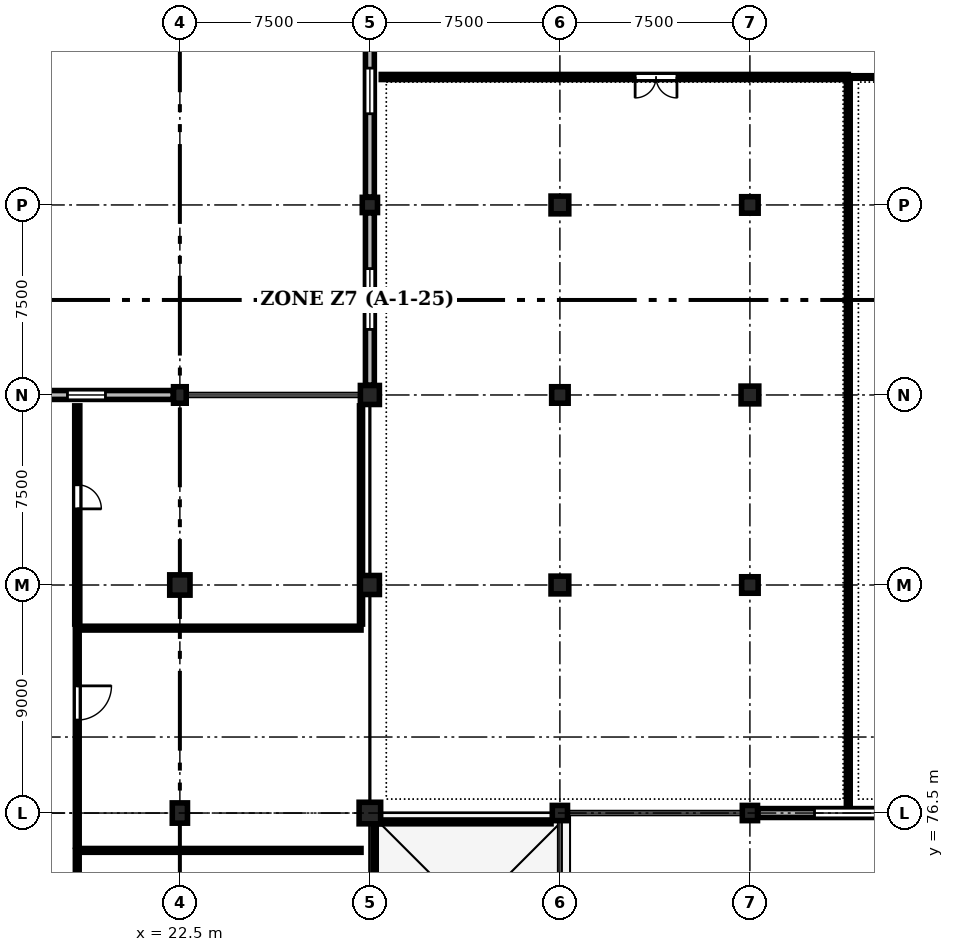
"""IFC4 building model, lengths in metres.
Left out: names, types, materials, properties, quantities, classifications, styles, units other than length and angle.
Written with IfcOpenShell. Run it as: python <this file> out.ifc"""

import sys

from ifc_helpers import new_model, si_unit, direction, frame, frame_2d, origin, origin_2d, place, context, subcontext, project, spatial, rectangle, circle, extrude, element, fill, save


model = new_model("IFC4")
c1 = context("Model", 3, precision=1e-05, world=origin(), true_north=direction((0.0, 1.0)))
c2 = subcontext(c1, "Body", "Model", "MODEL_VIEW")
j1 = project(units=[si_unit("LENGTHUNIT", "METRE"), si_unit("PLANEANGLEUNIT", "RADIAN")], contexts=[c1])
p1 = place(None, origin())
s1 = spatial("IfcSite", under=j1, at=p1, CompositionType="ELEMENT")
p2 = place(p1, origin())
s2 = spatial("IfcBuilding", under=s1, at=p2, CompositionType="ELEMENT")
p3 = place(p2, frame((0.0, 0.0, 4.8)))
s3 = spatial("IfcBuildingStorey", under=s2, at=p3, CompositionType="ELEMENT", Elevation=4.8)
p4 = place(p3, frame((22.5, 76.5, 0.0), z_axis=(0.0, 0.0, 1.0), x_axis=(1.0, 0.0, 0.0)))
e1 = element("IfcColumn", 1, at=p4, inside=s3, PredefinedType="COLUMN", context=c2, shape_type="SweptSolid", body=[
    extrude(rectangle(XDim=0.6, YDim=0.8, at=origin_2d()), origin(), (0.0, 0.0, 1.0), 4.5),
])
p5 = place(p3, frame((22.5, 85.5, 0.0), z_axis=(0.0, 0.0, 1.0), x_axis=(1.0, 0.0, 0.0)))
e2 = element("IfcColumn", 2, at=p5, inside=s3, PredefinedType="COLUMN", context=c2, shape_type="SweptSolid", body=[
    extrude(rectangle(XDim=0.8, YDim=0.8, at=origin_2d()), origin(), (0.0, 0.0, 1.0), 4.5),
])
p6 = place(p3, frame((22.5, 93.0, 0.0), z_axis=(0.0, 0.0, 1.0), x_axis=(1.0, 0.0, 0.0)))
e3 = element("IfcColumn", 3, at=p6, inside=s3, PredefinedType="COLUMN", context=c2, shape_type="SweptSolid", body=[
    extrude(rectangle(XDim=0.5, YDim=0.65, at=origin_2d()), origin(), (0.0, 0.0, 1.0), 4.5),
])
p7 = place(p3, frame((30.0, 76.5, 0.0), z_axis=(0.0, 0.0, 1.0), x_axis=(1.0, 0.0, 0.0)))
e4 = element("IfcColumn", 4, at=p7, inside=s3, PredefinedType="COLUMN", context=c2, shape_type="SweptSolid", body=[
    extrude(rectangle(XDim=0.85, YDim=0.85, at=origin_2d()), origin(), (0.0, 0.0, 1.0), 4.5),
])
p8 = place(p3, frame((30.0, 85.5, 0.0), z_axis=(0.0, 0.0, 1.0), x_axis=(1.0, 0.0, 0.0)))
e5 = element("IfcColumn", 5, at=p8, inside=s3, PredefinedType="COLUMN", context=c2, shape_type="SweptSolid", body=[
    extrude(circle(Radius=0.375, at=origin_2d()), origin(), (0.0, 0.0, 1.0), 4.5),
])
p9 = place(p3, frame((30.0, 93.0, 0.0), z_axis=(0.0, 0.0, 1.0), x_axis=(1.0, 0.0, 0.0)))
e6 = element("IfcColumn", 6, at=p9, inside=s3, PredefinedType="COLUMN", context=c2, shape_type="SweptSolid", body=[
    extrude(rectangle(XDim=0.75, YDim=0.75, at=origin_2d()), origin(), (0.0, 0.0, 1.0), 4.5),
])
p10 = place(p3, frame((30.0, 100.5, 0.0), z_axis=(0.0, 0.0, 1.0), x_axis=(1.0, 0.0, 0.0)))
e7 = element("IfcColumn", 7, at=p10, inside=s3, PredefinedType="COLUMN", context=c2, shape_type="SweptSolid", body=[
    extrude(rectangle(XDim=0.6, YDim=0.6, at=origin_2d()), origin(), (0.0, 0.0, 1.0), 4.5),
])
p11 = place(p3, frame((37.5, 76.5, 0.0), z_axis=(0.0, 0.0, 1.0), x_axis=(1.0, 0.0, 0.0)))
e8 = element("IfcColumn", 8, at=p11, inside=s3, PredefinedType="COLUMN", context=c2, shape_type="SweptSolid", body=[
    extrude(circle(Radius=0.3, at=origin_2d()), origin(), (0.0, 0.0, 1.0), 4.5),
])
p12 = place(p3, frame((37.5, 85.5, 0.0), z_axis=(0.0, 0.0, 1.0), x_axis=(1.0, 0.0, 0.0)))
e9 = element("IfcColumn", 9, at=p12, inside=s3, PredefinedType="COLUMN", context=c2, shape_type="SweptSolid", body=[
    extrude(rectangle(XDim=0.7, YDim=0.7, at=origin_2d()), origin(), (0.0, 0.0, 1.0), 4.5),
])
p13 = place(p3, frame((37.5, 93.0, 0.0), z_axis=(0.0, 0.0, 1.0), x_axis=(1.0, 0.0, 0.0)))
e10 = element("IfcColumn", 10, at=p13, inside=s3, PredefinedType="COLUMN", context=c2, shape_type="SweptSolid", body=[
    extrude(rectangle(XDim=0.65, YDim=0.65, at=origin_2d()), origin(), (0.0, 0.0, 1.0), 4.5),
])
p14 = place(p3, frame((37.5, 100.5, 0.0), z_axis=(0.0, 0.0, 1.0), x_axis=(1.0, 0.0, 0.0)))
e11 = element("IfcColumn", 11, at=p14, inside=s3, PredefinedType="COLUMN", context=c2, shape_type="SweptSolid", body=[
    extrude(rectangle(XDim=0.7, YDim=0.7, at=origin_2d()), origin(), (0.0, 0.0, 1.0), 4.5),
])
p15 = place(p3, frame((45.0, 76.5, 0.0), z_axis=(0.0, 0.0, 1.0), x_axis=(1.0, 0.0, 0.0)))
e12 = element("IfcColumn", 12, at=p15, inside=s3, PredefinedType="COLUMN", context=c2, shape_type="SweptSolid", body=[
    extrude(rectangle(XDim=0.6, YDim=0.6, at=origin_2d()), origin(), (0.0, 0.0, 1.0), 4.5),
])
p16 = place(p3, frame((45.0, 85.5, 0.0), z_axis=(0.0, 0.0, 1.0), x_axis=(1.0, 0.0, 0.0)))
e13 = element("IfcColumn", 13, at=p16, inside=s3, PredefinedType="COLUMN", context=c2, shape_type="SweptSolid", body=[
    extrude(rectangle(XDim=0.65, YDim=0.65, at=origin_2d()), origin(), (0.0, 0.0, 1.0), 4.5),
])
p17 = place(p3, frame((45.0, 93.0, 0.0), z_axis=(0.0, 0.0, 1.0), x_axis=(1.0, 0.0, 0.0)))
e14 = element("IfcColumn", 14, at=p17, inside=s3, PredefinedType="COLUMN", context=c2, shape_type="SweptSolid", body=[
    extrude(rectangle(XDim=0.7, YDim=0.7, at=origin_2d()), origin(), (0.0, 0.0, 1.0), 4.5),
])
p18 = place(p3, frame((45.0, 100.5, 0.0), z_axis=(0.0, 0.0, 1.0), x_axis=(1.0, 0.0, 0.0)))
e15 = element("IfcColumn", 15, at=p18, inside=s3, PredefinedType="COLUMN", context=c2, shape_type="SweptSolid", body=[
    extrude(rectangle(XDim=0.65, YDim=0.65, at=origin_2d()), origin(), (0.0, 0.0, 1.0), 4.5),
])
p19 = place(p3, frame((15.385, 93.0, 0.0), z_axis=(0.0, 0.0, 1.0), x_axis=(1.0, 0.0, 0.0)))
e16 = element("IfcWall", 16, at=p19, inside=s3, PredefinedType="STANDARD", context=c2, shape_type="SweptSolid", body=[
    extrude(rectangle(XDim=6.855, YDim=0.35, at=frame_2d((3.427, 0.0))), origin(), (0.0, 0.0, 1.0), 3.63),
])
p20 = place(p19, frame((2.677, 0.0, 0.9)))
e17 = element("IfcOpeningElement", 17, at=p20, cuts=e16, PredefinedType="OPENING", context=c2, shape_type="SweptSolid", body=[
    extrude(rectangle(XDim=1.5, YDim=2.4, at=frame_2d((0.75, 1.2))), frame((0.0, 0.185, 0.0), z_axis=(0.0, -1.0, 0.0), x_axis=(1.0, 0.0, 0.0)), (0.0, 0.0, 1.0), 0.37),
])
p21 = place(p3, frame((30.0, 93.385, 0.0), z_axis=(0.0, 0.0, 1.0), x_axis=(0.0, 1.0, 0.0)))
e18 = element("IfcWall", 18, at=p21, inside=s3, PredefinedType="STANDARD", context=c2, shape_type="SweptSolid", body=[
    extrude(rectangle(XDim=6.805, YDim=0.35, at=frame_2d((3.402, 0.0))), origin(), (0.0, 0.0, 1.0), 3.63),
])
p22 = place(p21, frame((2.202, 0.0, 0.9)))
e19 = element("IfcOpeningElement", 19, at=p22, cuts=e18, PredefinedType="OPENING", context=c2, shape_type="SweptSolid", body=[
    extrude(rectangle(XDim=2.4, YDim=2.45, at=frame_2d((1.2, 1.225))), frame((0.0, 0.185, 0.0), z_axis=(0.0, -1.0, 0.0), x_axis=(1.0, 0.0, 0.0)), (0.0, 0.0, 1.0), 0.37),
])
p23 = place(p3, frame((30.0, 100.81, 0.0), z_axis=(0.0, 0.0, 1.0), x_axis=(0.0, 1.0, 0.0)))
e20 = element("IfcWall", 20, at=p23, inside=s3, PredefinedType="STANDARD", context=c2, shape_type="SweptSolid", body=[
    extrude(rectangle(XDim=8.38, YDim=0.35, at=frame_2d((4.19, 0.0))), origin(), (0.0, 0.0, 1.0), 3.63),
])
p24 = place(p23, frame((3.29, 0.0, 0.9)))
e21 = element("IfcOpeningElement", 21, at=p24, cuts=e20, PredefinedType="OPENING", context=c2, shape_type="SweptSolid", body=[
    extrude(rectangle(XDim=1.8, YDim=2.1, at=frame_2d((0.9, 1.05))), frame((0.0, 0.185, 0.0), z_axis=(0.0, -1.0, 0.0), x_axis=(1.0, 0.0, 0.0)), (0.0, 0.0, 1.0), 0.37),
])
p25 = place(p3, frame((52.19, 76.5, 0.0), z_axis=(0.0, 0.0, 1.0), x_axis=(-1.0, 0.0, 0.0)))
e22 = element("IfcWall", 22, at=p25, inside=s3, PredefinedType="STANDARD", context=c2, shape_type="SweptSolid", body=[
    extrude(rectangle(XDim=6.88, YDim=0.35, at=frame_2d((3.44, 0.0))), origin(), (0.0, 0.0, 1.0), 3.63),
])
p26 = place(p25, frame((2.24, 0.0, 0.9)))
e23 = element("IfcOpeningElement", 23, at=p26, cuts=e22, PredefinedType="OPENING", context=c2, shape_type="SweptSolid", body=[
    extrude(rectangle(XDim=2.4, YDim=2.45, at=frame_2d((1.2, 1.225))), frame((0.0, 0.185, 0.0), z_axis=(0.0, -1.0, 0.0), x_axis=(1.0, 0.0, 0.0)), (0.0, 0.0, 1.0), 0.37),
])
p27 = place(p3, frame((18.45, 75.026, 0.0), z_axis=(0.0, 0.0, 1.0), x_axis=(0.0, -1.0, 0.0)))
e24 = element("IfcWall", 24, at=p27, inside=s3, PredefinedType="PARTITIONING", context=c2, shape_type="SweptSolid", body=[
    extrude(rectangle(XDim=8.612, YDim=0.15, at=frame_2d((4.306, 0.0))), origin(), (0.0, 0.0, 1.0), 3.765),
])
p28 = place(p27, frame((1.603, 0.0, 0.0)))
e25 = element("IfcOpeningElement", 25, at=p28, cuts=e24, PredefinedType="OPENING", context=c2, shape_type="SweptSolid", body=[
    extrude(rectangle(XDim=1.35, YDim=2.25, at=frame_2d((0.675, 1.125))), frame((0.0, 0.085, 0.0), z_axis=(0.0, -1.0, 0.0), x_axis=(1.0, 0.0, 0.0)), (0.0, 0.0, 1.0), 0.17),
])
p29 = place(p3, frame((18.45, 83.798, 0.0), z_axis=(0.0, 0.0, 1.0), x_axis=(0.0, -1.0, 0.0)))
e26 = element("IfcWall", 26, at=p29, inside=s3, PredefinedType="PARTITIONING", context=c2, shape_type="SweptSolid", body=[
    extrude(rectangle(XDim=8.612, YDim=0.15, at=frame_2d((4.306, 0.0))), origin(), (0.0, 0.0, 1.0), 3.765),
])
p30 = place(p29, frame((2.279, 0.0, 0.0)))
e27 = element("IfcOpeningElement", 27, at=p30, cuts=e26, PredefinedType="OPENING", context=c2, shape_type="SweptSolid", body=[
    extrude(rectangle(XDim=1.35, YDim=2.25, at=frame_2d((0.675, 1.125))), frame((0.0, 0.085, 0.0), z_axis=(0.0, -1.0, 0.0), x_axis=(1.0, 0.0, 0.0)), (0.0, 0.0, 1.0), 0.17),
])
p31 = place(p3, frame((18.45, 92.57, 0.0), z_axis=(0.0, 0.0, 1.0), x_axis=(0.0, -1.0, 0.0)))
e28 = element("IfcWall", 28, at=p31, inside=s3, PredefinedType="STANDARD", context=c2, shape_type="SweptSolid", body=[
    extrude(rectangle(XDim=8.612, YDim=0.2, at=frame_2d((4.306, 0.0))), origin(), (0.0, 0.0, 1.0), 3.765),
])
p32 = place(p31, frame((3.115, 0.0, 0.0)))
e29 = element("IfcOpeningElement", 29, at=p32, cuts=e28, PredefinedType="OPENING", context=c2, shape_type="SweptSolid", body=[
    extrude(rectangle(XDim=0.95, YDim=2.15, at=frame_2d((0.475, 1.075))), frame((0.0, 0.11, 0.0), z_axis=(0.0, -1.0, 0.0), x_axis=(1.0, 0.0, 0.0)), (0.0, 0.0, 1.0), 0.22),
])
p33 = place(p3, frame((30.2, 76.15, 0.0), z_axis=(0.0, 0.0, 1.0), x_axis=(0.0, -1.0, 0.0)))
e30 = element("IfcWall", 30, at=p33, inside=s3, PredefinedType="PARTITIONING", context=c2, shape_type="SweptSolid", body=[
    extrude(rectangle(XDim=44.65, YDim=0.1, at=frame_2d((22.325, 0.0))), origin(), (0.0, 0.0, 1.0), 3.615),
])
p34 = place(p33, frame((17.49, 0.0, 0.0)))
e31 = element("IfcOpeningElement", 31, at=p34, cuts=e30, PredefinedType="OPENING", context=c2, shape_type="SweptSolid", body=[
    extrude(rectangle(XDim=1.05, YDim=2.2, at=frame_2d((0.525, 1.1))), frame((0.0, 0.06, 0.0), z_axis=(0.0, -1.0, 0.0), x_axis=(1.0, 0.0, 0.0)), (0.0, 0.0, 1.0), 0.12),
])
p35 = place(p3, frame((48.883, 105.55, 0.0), z_axis=(0.0, 0.0, 1.0), x_axis=(-1.0, 0.0, 0.0)))
e32 = element("IfcWall", 32, at=p35, inside=s3, PredefinedType="STANDARD", context=c2, shape_type="SweptSolid", body=[
    extrude(rectangle(XDim=18.433, YDim=0.2, at=frame_2d((9.217, 0.0))), origin(), (0.0, 0.0, 1.0), 4.165),
])
p36 = place(p35, frame((6.763, 0.0, 0.0)))
e33 = element("IfcOpeningElement", 33, at=p36, cuts=e32, PredefinedType="OPENING", context=c2, shape_type="SweptSolid", body=[
    extrude(rectangle(XDim=1.65, YDim=2.35, at=frame_2d((0.825, 1.175))), frame((0.0, 0.11, 0.0), z_axis=(0.0, -1.0, 0.0), x_axis=(1.0, 0.0, 0.0)), (0.0, 0.0, 1.0), 0.22),
])
p37 = place(p3, frame((67.517, 105.55, 0.0), z_axis=(0.0, 0.0, 1.0), x_axis=(-1.0, 0.0, 0.0)))
e34 = element("IfcWall", 34, at=p37, inside=s3, PredefinedType="PARTITIONING", context=c2, shape_type="SweptSolid", body=[
    extrude(rectangle(XDim=18.433, YDim=0.1, at=frame_2d((9.217, 0.0))), origin(), (0.0, 0.0, 1.0), 4.165),
])
p38 = place(p37, frame((10.02, 0.0, 0.0)))
e35 = element("IfcOpeningElement", 35, at=p38, cuts=e34, PredefinedType="OPENING", context=c2, shape_type="SweptSolid", body=[
    extrude(rectangle(XDim=1.65, YDim=2.35, at=frame_2d((0.825, 1.175))), frame((0.0, 0.06, 0.0), z_axis=(0.0, -1.0, 0.0), x_axis=(1.0, 0.0, 0.0)), (0.0, 0.0, 1.0), 0.12),
])
for number, where, z_axis, x_axis in (
    (36, (18.45, 75.026, 0.0), (0.0, 0.0, 1.0), (1.0, 0.0, 0.0)),
    (37, (18.45, 83.798, 0.0), (0.0, 0.0, 1.0), (1.0, 0.0, 0.0)),
):
    element("IfcWall", number, at=place(p3, frame(where, z_axis=z_axis, x_axis=x_axis)), inside=s3, PredefinedType="PARTITIONING", context=c2, shape_type="SweptSolid", body=[
        extrude(rectangle(XDim=11.2, YDim=0.15, at=frame_2d((5.6, 0.0))), origin(), (0.0, 0.0, 1.0), 4.165),
    ])
p39 = place(p3, frame((30.2, 76.15, 0.0), z_axis=(0.0, 0.0, 1.0), x_axis=(1.0, 0.0, 0.0)))
e38 = element("IfcWall", 38, at=p39, inside=s3, PredefinedType="PARTITIONING", context=c2, shape_type="SweptSolid", body=[
    extrude(rectangle(XDim=6.95, YDim=0.15, at=frame_2d((3.475, 0.0))), origin(), (0.0, 0.0, 1.0), 3.615),
])
p40 = place(p3, frame((48.883, 76.85, 0.0), z_axis=(0.0, 0.0, 1.0), x_axis=(0.0, 1.0, 0.0)))
e39 = element("IfcWall", 39, at=p40, inside=s3, PredefinedType="PARTITIONING", context=c2, shape_type="SweptSolid", body=[
    extrude(rectangle(XDim=28.7, YDim=0.15, at=frame_2d((14.35, 0.0))), origin(), (0.0, 0.0, 1.0), 3.765),
])
p41 = place(p3, frame((29.65, 83.958, 0.0), z_axis=(0.0, 0.0, 1.0), x_axis=(0.0, 1.0, 0.0)))
e40 = element("IfcWall", 40, at=p41, inside=s3, PredefinedType="PARTITIONING", context=c2, shape_type="SweptSolid", body=[
    extrude(rectangle(XDim=8.612, YDim=0.12, at=frame_2d((4.306, 0.0))), origin(), (0.0, 0.0, 1.0), 3.465),
])
p42 = place(p20, origin())
e41 = element("IfcWindow", 41, at=p42, inside=s3, PartitioningType="SINGLE_PANEL", PredefinedType="WINDOW", context=c2, shape_type="SweptSolid", body=[
    extrude(rectangle(XDim=1.5, YDim=2.4, at=frame_2d((0.75, 1.2))), frame((0.0, 0.03, 0.0), z_axis=(0.0, -1.0, 0.0), x_axis=(1.0, 0.0, 0.0)), (0.0, 0.0, 1.0), 0.06),
])
fill(e17, e41)
p43 = place(p22, origin())
e42 = element("IfcWindow", 42, at=p43, inside=s3, PartitioningType="SINGLE_PANEL", PredefinedType="WINDOW", context=c2, shape_type="SweptSolid", body=[
    extrude(rectangle(XDim=2.4, YDim=2.45, at=frame_2d((1.2, 1.225))), frame((0.0, 0.03, 0.0), z_axis=(0.0, -1.0, 0.0), x_axis=(1.0, 0.0, 0.0)), (0.0, 0.0, 1.0), 0.06),
])
fill(e19, e42)
p44 = place(p24, origin())
e43 = element("IfcWindow", 43, at=p44, inside=s3, PartitioningType="SINGLE_PANEL", PredefinedType="WINDOW", context=c2, shape_type="SweptSolid", body=[
    extrude(rectangle(XDim=1.8, YDim=2.1, at=frame_2d((0.9, 1.05))), frame((0.0, 0.03, 0.0), z_axis=(0.0, -1.0, 0.0), x_axis=(1.0, 0.0, 0.0)), (0.0, 0.0, 1.0), 0.06),
])
fill(e21, e43)
p45 = place(p26, origin())
e44 = element("IfcWindow", 44, at=p45, inside=s3, PartitioningType="SINGLE_PANEL", PredefinedType="WINDOW", context=c2, shape_type="SweptSolid", body=[
    extrude(rectangle(XDim=2.4, YDim=2.45, at=frame_2d((1.2, 1.225))), frame((0.0, 0.03, 0.0), z_axis=(0.0, -1.0, 0.0), x_axis=(1.0, 0.0, 0.0)), (0.0, 0.0, 1.0), 0.06),
])
fill(e23, e44)
p46 = place(p30, origin())
e45 = element("IfcDoor", 45, at=p46, inside=s3, OperationType="SINGLE_SWING_LEFT", PredefinedType="DOOR", context=c2, shape_type="SweptSolid", body=[
    extrude(rectangle(XDim=1.35, YDim=2.25, at=frame_2d((0.675, 1.125))), frame((0.0, 0.025, 0.0), z_axis=(0.0, -1.0, 0.0), x_axis=(1.0, 0.0, 0.0)), (0.0, 0.0, 1.0), 0.05),
])
fill(e27, e45)
p47 = place(p32, origin())
e46 = element("IfcDoor", 46, at=p47, inside=s3, OperationType="SINGLE_SWING_RIGHT", PredefinedType="DOOR", context=c2, shape_type="SweptSolid", body=[
    extrude(rectangle(XDim=0.95, YDim=2.15, at=frame_2d((0.475, 1.075))), frame((0.0, 0.025, 0.0), z_axis=(0.0, -1.0, 0.0), x_axis=(1.0, 0.0, 0.0)), (0.0, 0.0, 1.0), 0.05),
])
fill(e29, e46)
p48 = place(p36, origin())
e47 = element("IfcDoor", 47, at=p48, inside=s3, OperationType="DOUBLE_DOOR_SINGLE_SWING", PredefinedType="DOOR", context=c2, shape_type="SweptSolid", body=[
    extrude(rectangle(XDim=1.65, YDim=2.35, at=frame_2d((0.825, 1.175))), frame((0.0, 0.025, 0.0), z_axis=(0.0, -1.0, 0.0), x_axis=(1.0, 0.0, 0.0)), (0.0, 0.0, 1.0), 0.05),
])
fill(e33, e47)
save(model, sys.argv[1])
